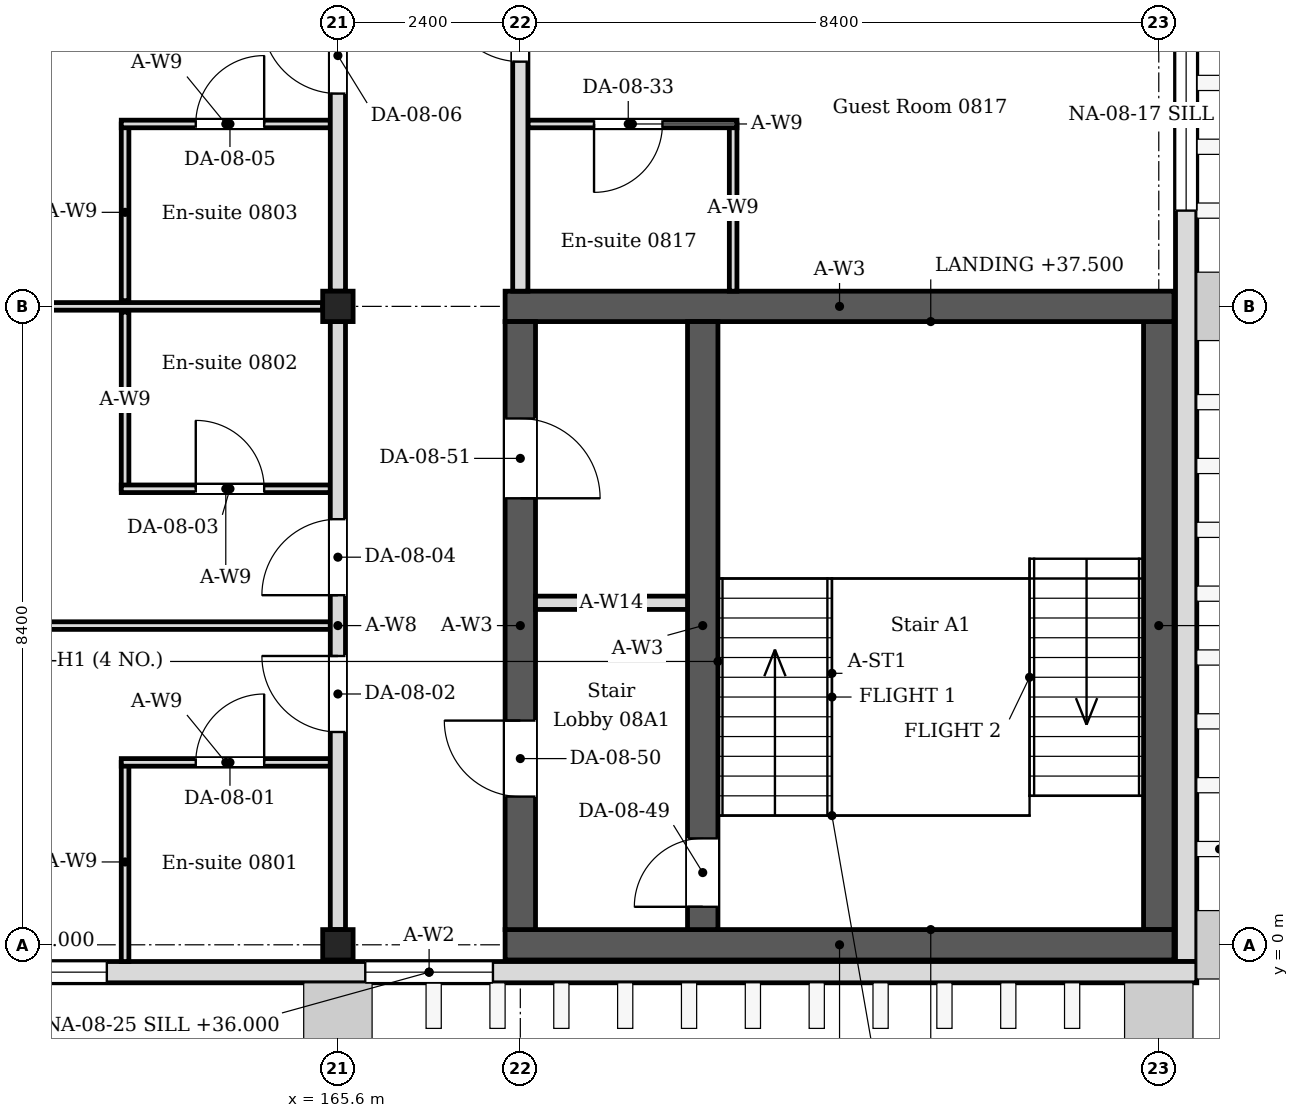
"""IFC4 building model, lengths in metres.
Left out: names, types, materials, properties, quantities, classifications, styles, units other than length and angle.
Written with IfcOpenShell. Run it as: python <this file> out.ifc"""

import sys

from ifc_helpers import new_model, si_unit, direction, frame, frame_2d, origin, origin_2d, place, context, subcontext, project, spatial, rectangle, i_section, extrude, element, fill, save


model = new_model("IFC4")
c1 = context("Model", 3, precision=1e-05, world=origin(), true_north=direction((0.0, 1.0)))
c2 = subcontext(c1, "Body", "Model", "MODEL_VIEW")
j1 = project(units=[si_unit("LENGTHUNIT", "METRE"), si_unit("PLANEANGLEUNIT", "RADIAN")], contexts=[c1])
p1 = place(None, origin())
s1 = spatial("IfcSite", under=j1, at=p1, CompositionType="ELEMENT")
p2 = place(p1, origin())
s2 = spatial("IfcBuilding", under=s1, at=p2, CompositionType="ELEMENT")
p3 = place(p2, frame((0.0, 0.0, 35.4)))
s3 = spatial("IfcBuildingStorey", under=s2, at=p3, CompositionType="ELEMENT", Elevation=35.4)
for number, where, z_axis, x_axis in (
    (1, (165.6, 0.0, 0.0), (0.0, 0.0, 1.0), (1.0, 0.0, 0.0)),
    (2, (165.6, 8.4, 0.0), (0.0, 0.0, 1.0), (1.0, 0.0, 0.0)),
):
    element("IfcColumn", number, at=place(p3, frame(where, z_axis=z_axis, x_axis=x_axis)), inside=s3, PredefinedType="COLUMN", context=c2, shape_type="SweptSolid", body=[
        extrude(i_section(OverallWidth=0.4, OverallDepth=0.4, WebThickness=0.013, FlangeThickness=0.021, FilletRadius=0.022, at=origin_2d()), origin(), (0.0, 0.0, 1.0), 4.2),
    ])
for number, where, z_axis, x_axis in (
    (3, (167.8, 0.0, 0.0), (0.0, 0.0, 1.0), (1.0, 0.0, 0.0)),
    (4, (167.8, 8.4, 0.0), (0.0, 0.0, 1.0), (1.0, 0.0, 0.0)),
):
    element("IfcWall", number, at=place(p3, frame(where, z_axis=z_axis, x_axis=x_axis)), inside=s3, PredefinedType="SOLIDWALL", context=c2, shape_type="SweptSolid", body=[
        extrude(rectangle(XDim=8.8, YDim=0.4, at=frame_2d((4.4, 0.0))), origin(), (0.0, 0.0, 1.0), 4.05),
    ])
p4 = place(p3, frame((168.0, 0.2, 0.0), z_axis=(0.0, 0.0, 1.0), x_axis=(0.0, 1.0, 0.0)))
e5 = element("IfcWall", 5, at=p4, inside=s3, PredefinedType="SOLIDWALL", context=c2, shape_type="SweptSolid", body=[
    extrude(rectangle(XDim=8.0, YDim=0.4, at=frame_2d((4.0, 0.0))), origin(), (0.0, 0.0, 1.0), 4.05),
])
p5 = place(p4, frame((1.75, 0.0, 0.0)))
e6 = element("IfcOpeningElement", 6, at=p5, cuts=e5, PredefinedType="OPENING", context=c2, shape_type="SweptSolid", body=[
    extrude(rectangle(XDim=1.0, YDim=2.1, at=frame_2d((0.5, 1.05))), frame((0.0, 0.21, 0.0), z_axis=(0.0, -1.0, 0.0), x_axis=(1.0, 0.0, 0.0)), (0.0, 0.0, 1.0), 0.42),
])
p6 = place(p4, frame((5.675, 0.0, 0.0)))
e7 = element("IfcOpeningElement", 7, at=p6, cuts=e5, PredefinedType="OPENING", context=c2, shape_type="SweptSolid", body=[
    extrude(rectangle(XDim=1.05, YDim=2.1, at=frame_2d((0.525, 1.05))), frame((0.0, 0.21, 0.0), z_axis=(0.0, -1.0, 0.0), x_axis=(1.0, 0.0, 0.0)), (0.0, 0.0, 1.0), 0.42),
])
p7 = place(p3, frame((176.4, 0.2, 0.0), z_axis=(0.0, 0.0, 1.0), x_axis=(0.0, 1.0, 0.0)))
e8 = element("IfcWall", 8, at=p7, inside=s3, PredefinedType="SOLIDWALL", context=c2, shape_type="SweptSolid", body=[
    extrude(rectangle(XDim=8.0, YDim=0.4, at=frame_2d((4.0, 0.0))), origin(), (0.0, 0.0, 1.0), 4.05),
])
p8 = place(p3, frame((176.76, -0.22, 0.0), z_axis=(0.0, 0.0, 1.0), x_axis=(0.0, 1.0, 0.0)))
e9 = element("IfcWall", 9, at=p8, inside=s3, PredefinedType="SOLIDWALL", context=c2, shape_type="SweptSolid", body=[
    extrude(rectangle(XDim=42.57, YDim=0.28, at=frame_2d((21.285, 0.0))), origin(), (0.0, 0.0, 1.0), 4.05),
])
p9 = place(p8, frame((9.88, 0.0, 0.6)))
e10 = element("IfcOpeningElement", 10, at=p9, cuts=e9, PredefinedType="OPENING", context=c2, shape_type="SweptSolid", body=[
    extrude(rectangle(XDim=2.52, YDim=2.4, at=frame_2d((1.26, 1.2))), frame((0.0, 0.15, 0.0), z_axis=(0.0, -1.0, 0.0), x_axis=(1.0, 0.0, 0.0)), (0.0, 0.0, 1.0), 0.3),
])
p10 = place(p8, frame((14.08, 0.0, 0.6)))
e11 = element("IfcOpeningElement", 11, at=p10, cuts=e9, PredefinedType="OPENING", context=c2, shape_type="SweptSolid", body=[
    extrude(rectangle(XDim=2.52, YDim=2.4, at=frame_2d((1.26, 1.2))), frame((0.0, 0.15, 0.0), z_axis=(0.0, -1.0, 0.0), x_axis=(1.0, 0.0, 0.0)), (0.0, 0.0, 1.0), 0.3),
])
p11 = place(p8, frame((17.44, 0.0, 0.6)))
e12 = element("IfcOpeningElement", 12, at=p11, cuts=e9, PredefinedType="OPENING", context=c2, shape_type="SweptSolid", body=[
    extrude(rectangle(XDim=2.52, YDim=2.4, at=frame_2d((1.26, 1.2))), frame((0.0, 0.15, 0.0), z_axis=(0.0, -1.0, 0.0), x_axis=(1.0, 0.0, 0.0)), (0.0, 0.0, 1.0), 0.3),
])
p12 = place(p8, frame((21.64, 0.0, 0.6)))
e13 = element("IfcOpeningElement", 13, at=p12, cuts=e9, PredefinedType="OPENING", context=c2, shape_type="SweptSolid", body=[
    extrude(rectangle(XDim=2.52, YDim=2.4, at=frame_2d((1.26, 1.2))), frame((0.0, 0.15, 0.0), z_axis=(0.0, -1.0, 0.0), x_axis=(1.0, 0.0, 0.0)), (0.0, 0.0, 1.0), 0.3),
])
p13 = place(p3, frame((156.7, -0.36, 0.0), z_axis=(0.0, 0.0, 1.0), x_axis=(1.0, 0.0, 0.0)))
e14 = element("IfcWall", 14, at=p13, inside=s3, PredefinedType="SOLIDWALL", context=c2, shape_type="SweptSolid", body=[
    extrude(rectangle(XDim=20.2, YDim=0.28, at=frame_2d((10.1, 0.0))), origin(), (0.0, 0.0, 1.0), 4.05),
])
p14 = place(p13, frame((9.26, 0.0, 0.6)))
e15 = element("IfcOpeningElement", 15, at=p14, cuts=e14, PredefinedType="OPENING", context=c2, shape_type="SweptSolid", body=[
    extrude(rectangle(XDim=1.68, YDim=2.4, at=frame_2d((0.84, 1.2))), frame((0.0, 0.15, 0.0), z_axis=(0.0, -1.0, 0.0), x_axis=(1.0, 0.0, 0.0)), (0.0, 0.0, 1.0), 0.3),
])
p15 = place(p13, frame((3.34, 0.0, 0.6)))
e16 = element("IfcOpeningElement", 16, at=p15, cuts=e14, PredefinedType="OPENING", context=c2, shape_type="SweptSolid", body=[
    extrude(rectangle(XDim=2.52, YDim=2.4, at=frame_2d((1.26, 1.2))), frame((0.0, 0.15, 0.0), z_axis=(0.0, -1.0, 0.0), x_axis=(1.0, 0.0, 0.0)), (0.0, 0.0, 1.0), 0.3),
])
p16 = place(p3, frame((162.8, -0.22, 0.0), z_axis=(0.0, 0.0, 1.0), x_axis=(0.0, 1.0, 0.0)))
e17 = element("IfcWall", 17, at=p16, inside=s3, PredefinedType="PARTITIONING", context=c2, shape_type="SweptSolid", body=[
    extrude(rectangle(XDim=2.62, YDim=0.1, at=frame_2d((1.31, 0.0))), origin(), (0.0, 0.0, 1.0), 4.05),
])
p17 = place(p3, frame((162.75, 2.4, 0.0), z_axis=(0.0, 0.0, 1.0), x_axis=(1.0, 0.0, 0.0)))
e18 = element("IfcWall", 18, at=p17, inside=s3, PredefinedType="PARTITIONING", context=c2, shape_type="SweptSolid", body=[
    extrude(rectangle(XDim=2.75, YDim=0.1, at=frame_2d((1.375, 0.0))), origin(), (0.0, 0.0, 1.0), 4.05),
])
p18 = place(p17, frame((0.98, 0.0, 0.0)))
e19 = element("IfcOpeningElement", 19, at=p18, cuts=e18, PredefinedType="OPENING", context=c2, shape_type="SweptSolid", body=[
    extrude(rectangle(XDim=0.9, YDim=2.1, at=frame_2d((0.45, 1.05))), frame((0.0, 0.06, 0.0), z_axis=(0.0, -1.0, 0.0), x_axis=(1.0, 0.0, 0.0)), (0.0, 0.0, 1.0), 0.12),
])
p19 = place(p3, frame((162.8, 6.0, 0.0), z_axis=(0.0, 0.0, 1.0), x_axis=(0.0, 1.0, 0.0)))
e20 = element("IfcWall", 20, at=p19, inside=s3, PredefinedType="PARTITIONING", context=c2, shape_type="SweptSolid", body=[
    extrude(rectangle(XDim=2.325, YDim=0.1, at=frame_2d((1.163, 0.0))), origin(), (0.0, 0.0, 1.0), 4.05),
])
p20 = place(p3, frame((162.75, 6.0, 0.0), z_axis=(0.0, 0.0, 1.0), x_axis=(1.0, 0.0, 0.0)))
e21 = element("IfcWall", 21, at=p20, inside=s3, PredefinedType="PARTITIONING", context=c2, shape_type="SweptSolid", body=[
    extrude(rectangle(XDim=2.75, YDim=0.1, at=frame_2d((1.375, 0.0))), origin(), (0.0, 0.0, 1.0), 4.05),
])
p21 = place(p20, frame((0.98, 0.0, 0.0)))
e22 = element("IfcOpeningElement", 22, at=p21, cuts=e21, PredefinedType="OPENING", context=c2, shape_type="SweptSolid", body=[
    extrude(rectangle(XDim=0.9, YDim=2.1, at=frame_2d((0.45, 1.05))), frame((0.0, 0.06, 0.0), z_axis=(0.0, -1.0, 0.0), x_axis=(1.0, 0.0, 0.0)), (0.0, 0.0, 1.0), 0.12),
])
p22 = place(p3, frame((162.8, 8.475, 0.0), z_axis=(0.0, 0.0, 1.0), x_axis=(0.0, 1.0, 0.0)))
e23 = element("IfcWall", 23, at=p22, inside=s3, PredefinedType="PARTITIONING", context=c2, shape_type="SweptSolid", body=[
    extrude(rectangle(XDim=2.325, YDim=0.1, at=frame_2d((1.163, 0.0))), origin(), (0.0, 0.0, 1.0), 4.05),
])
p23 = place(p3, frame((162.75, 10.8, 0.0), z_axis=(0.0, 0.0, 1.0), x_axis=(1.0, 0.0, 0.0)))
e24 = element("IfcWall", 24, at=p23, inside=s3, PredefinedType="PARTITIONING", context=c2, shape_type="SweptSolid", body=[
    extrude(rectangle(XDim=2.75, YDim=0.1, at=frame_2d((1.375, 0.0))), origin(), (0.0, 0.0, 1.0), 4.05),
])
p24 = place(p23, frame((0.98, 0.0, 0.0)))
e25 = element("IfcOpeningElement", 25, at=p24, cuts=e24, PredefinedType="OPENING", context=c2, shape_type="SweptSolid", body=[
    extrude(rectangle(XDim=0.9, YDim=2.1, at=frame_2d((0.45, 1.05))), frame((0.0, 0.06, 0.0), z_axis=(0.0, -1.0, 0.0), x_axis=(1.0, 0.0, 0.0)), (0.0, 0.0, 1.0), 0.12),
])
p25 = place(p3, frame((170.8, 8.6, 0.0), z_axis=(0.0, 0.0, 1.0), x_axis=(0.0, 1.0, 0.0)))
e26 = element("IfcWall", 26, at=p25, inside=s3, PredefinedType="PARTITIONING", context=c2, shape_type="SweptSolid", body=[
    extrude(rectangle(XDim=2.2, YDim=0.1, at=frame_2d((1.1, 0.0))), origin(), (0.0, 0.0, 1.0), 4.05),
])
p26 = place(p3, frame((170.85, 10.8, 0.0), z_axis=(0.0, 0.0, 1.0), x_axis=(-1.0, 0.0, 0.0)))
e27 = element("IfcWall", 27, at=p26, inside=s3, PredefinedType="PARTITIONING", context=c2, shape_type="SweptSolid", body=[
    extrude(rectangle(XDim=2.75, YDim=0.1, at=frame_2d((1.375, 0.0))), origin(), (0.0, 0.0, 1.0), 4.05),
])
p27 = place(p26, frame((0.98, 0.0, 0.0)))
e28 = element("IfcOpeningElement", 28, at=p27, cuts=e27, PredefinedType="OPENING", context=c2, shape_type="SweptSolid", body=[
    extrude(rectangle(XDim=0.9, YDim=2.1, at=frame_2d((0.45, 1.05))), frame((0.0, 0.06, 0.0), z_axis=(0.0, -1.0, 0.0), x_axis=(1.0, 0.0, 0.0)), (0.0, 0.0, 1.0), 0.12),
])
p28 = place(p3, frame((157.4, 8.4, 0.0), z_axis=(0.0, 0.0, 1.0), x_axis=(1.0, 0.0, 0.0)))
e29 = element("IfcWall", 29, at=p28, inside=s3, PredefinedType="PARTITIONING", context=c2, shape_type="SweptSolid", body=[
    extrude(rectangle(XDim=8.0, YDim=0.1, at=frame_2d((4.0, 0.0))), origin(), (0.0, 0.0, 1.0), 3.604),
])
p29 = place(p3, frame((156.98, 4.2, 0.0), z_axis=(0.0, 0.0, 1.0), x_axis=(1.0, 0.0, 0.0)))
e30 = element("IfcWall", 30, at=p29, inside=s3, PredefinedType="PARTITIONING", context=c2, shape_type="SweptSolid", body=[
    extrude(rectangle(XDim=8.52, YDim=0.1, at=frame_2d((4.26, 0.0))), origin(), (0.0, 0.0, 1.0), 3.604),
])
p30 = place(p3, frame((165.6, 0.2, 0.0), z_axis=(0.0, 0.0, 1.0), x_axis=(0.0, 1.0, 0.0)))
e31 = element("IfcWall", 31, at=p30, inside=s3, PredefinedType="PARTITIONING", context=c2, shape_type="SweptSolid", body=[
    extrude(rectangle(XDim=8.0, YDim=0.2, at=frame_2d((4.0, 0.0))), origin(), (0.0, 0.0, 1.0), 3.45),
])
p31 = place(p30, frame((2.6, 0.0, 0.0)))
e32 = element("IfcOpeningElement", 32, at=p31, cuts=e31, PredefinedType="OPENING", context=c2, shape_type="SweptSolid", body=[
    extrude(rectangle(XDim=1.0, YDim=2.4, at=frame_2d((0.5, 1.2))), frame((0.0, 0.11, 0.0), z_axis=(0.0, -1.0, 0.0), x_axis=(1.0, 0.0, 0.0)), (0.0, 0.0, 1.0), 0.22),
])
p32 = place(p30, frame((4.4, 0.0, 0.0)))
e33 = element("IfcOpeningElement", 33, at=p32, cuts=e31, PredefinedType="OPENING", context=c2, shape_type="SweptSolid", body=[
    extrude(rectangle(XDim=1.0, YDim=2.4, at=frame_2d((0.5, 1.2))), frame((0.0, 0.11, 0.0), z_axis=(0.0, -1.0, 0.0), x_axis=(1.0, 0.0, 0.0)), (0.0, 0.0, 1.0), 0.22),
])
p33 = place(p3, frame((165.6, 8.6, 0.0), z_axis=(0.0, 0.0, 1.0), x_axis=(0.0, 1.0, 0.0)))
e34 = element("IfcWall", 34, at=p33, inside=s3, PredefinedType="PARTITIONING", context=c2, shape_type="SweptSolid", body=[
    extrude(rectangle(XDim=8.0, YDim=0.2, at=frame_2d((4.0, 0.0))), origin(), (0.0, 0.0, 1.0), 3.45),
])
p34 = place(p33, frame((2.6, 0.0, 0.0)))
e35 = element("IfcOpeningElement", 35, at=p34, cuts=e34, PredefinedType="OPENING", context=c2, shape_type="SweptSolid", body=[
    extrude(rectangle(XDim=1.0, YDim=2.4, at=frame_2d((0.5, 1.2))), frame((0.0, 0.11, 0.0), z_axis=(0.0, -1.0, 0.0), x_axis=(1.0, 0.0, 0.0)), (0.0, 0.0, 1.0), 0.22),
])
p35 = place(p33, frame((4.4, 0.0, 0.0)))
e36 = element("IfcOpeningElement", 36, at=p35, cuts=e34, PredefinedType="OPENING", context=c2, shape_type="SweptSolid", body=[
    extrude(rectangle(XDim=1.0, YDim=2.4, at=frame_2d((0.5, 1.2))), frame((0.0, 0.11, 0.0), z_axis=(0.0, -1.0, 0.0), x_axis=(1.0, 0.0, 0.0)), (0.0, 0.0, 1.0), 0.22),
])
p36 = place(p3, frame((168.0, 8.6, 0.0), z_axis=(0.0, 0.0, 1.0), x_axis=(0.0, 1.0, 0.0)))
e37 = element("IfcWall", 37, at=p36, inside=s3, PredefinedType="PARTITIONING", context=c2, shape_type="SweptSolid", body=[
    extrude(rectangle(XDim=8.0, YDim=0.2, at=frame_2d((4.0, 0.0))), origin(), (0.0, 0.0, 1.0), 3.45),
])
p37 = place(p36, frame((3.02, 0.0, 0.0)))
e38 = element("IfcOpeningElement", 38, at=p37, cuts=e37, PredefinedType="OPENING", context=c2, shape_type="SweptSolid", body=[
    extrude(rectangle(XDim=1.0, YDim=2.4, at=frame_2d((0.5, 1.2))), frame((0.0, 0.11, 0.0), z_axis=(0.0, -1.0, 0.0), x_axis=(1.0, 0.0, 0.0)), (0.0, 0.0, 1.0), 0.22),
])
p38 = place(p36, frame((5.02, 0.0, 0.0)))
e39 = element("IfcOpeningElement", 39, at=p38, cuts=e37, PredefinedType="OPENING", context=c2, shape_type="SweptSolid", body=[
    extrude(rectangle(XDim=1.0, YDim=2.4, at=frame_2d((0.5, 1.2))), frame((0.0, 0.11, 0.0), z_axis=(0.0, -1.0, 0.0), x_axis=(1.0, 0.0, 0.0)), (0.0, 0.0, 1.0), 0.22),
])
p39 = place(p3, frame((170.4, 0.2, 0.0), z_axis=(0.0, 0.0, 1.0), x_axis=(0.0, 1.0, 0.0)))
e40 = element("IfcWall", 40, at=p39, inside=s3, PredefinedType="SOLIDWALL", context=c2, shape_type="SweptSolid", body=[
    extrude(rectangle(XDim=8.0, YDim=0.4, at=frame_2d((4.0, 0.0))), origin(), (0.0, 0.0, 1.0), 4.05),
])
p40 = place(p39, frame((0.3, 0.0, 0.0)))
e41 = element("IfcOpeningElement", 41, at=p40, cuts=e40, PredefinedType="OPENING", context=c2, shape_type="SweptSolid", body=[
    extrude(rectangle(XDim=0.9, YDim=2.1, at=frame_2d((0.45, 1.05))), frame((0.0, 0.21, 0.0), z_axis=(0.0, -1.0, 0.0), x_axis=(1.0, 0.0, 0.0)), (0.0, 0.0, 1.0), 0.42),
])
p41 = place(p3, frame((168.2, 4.5, 0.0), z_axis=(0.0, 0.0, 1.0), x_axis=(1.0, 0.0, 0.0)))
e42 = element("IfcWall", 42, at=p41, inside=s3, PredefinedType="PARTITIONING", context=c2, shape_type="SweptSolid", body=[
    extrude(rectangle(XDim=2.0, YDim=0.175, at=frame_2d((1.0, 0.0))), origin(), (0.0, 0.0, 1.0), 4.05),
])
p42 = place(p9, origin())
e43 = element("IfcWindow", 43, at=p42, inside=s3, PartitioningType="SINGLE_PANEL", PredefinedType="WINDOW", context=c2, shape_type="SweptSolid", body=[
    extrude(rectangle(XDim=2.52, YDim=2.4, at=frame_2d((1.26, 1.2))), frame((0.0, 0.03, 0.0), z_axis=(0.0, -1.0, 0.0), x_axis=(1.0, 0.0, 0.0)), (0.0, 0.0, 1.0), 0.06),
])
fill(e10, e43)
p43 = place(p14, origin())
e44 = element("IfcWindow", 44, at=p43, inside=s3, PartitioningType="SINGLE_PANEL", PredefinedType="WINDOW", context=c2, shape_type="SweptSolid", body=[
    extrude(rectangle(XDim=1.68, YDim=2.4, at=frame_2d((0.84, 1.2))), frame((0.0, 0.03, 0.0), z_axis=(0.0, -1.0, 0.0), x_axis=(1.0, 0.0, 0.0)), (0.0, 0.0, 1.0), 0.06),
])
fill(e15, e44)
p44 = place(p15, origin())
e45 = element("IfcWindow", 45, at=p44, inside=s3, PartitioningType="SINGLE_PANEL", PredefinedType="WINDOW", context=c2, shape_type="SweptSolid", body=[
    extrude(rectangle(XDim=2.52, YDim=2.4, at=frame_2d((1.26, 1.2))), frame((0.0, 0.03, 0.0), z_axis=(0.0, -1.0, 0.0), x_axis=(1.0, 0.0, 0.0)), (0.0, 0.0, 1.0), 0.06),
])
fill(e16, e45)
p45 = place(p18, origin())
e46 = element("IfcDoor", 46, at=p45, inside=s3, OperationType="SINGLE_SWING_RIGHT", PredefinedType="DOOR", context=c2, shape_type="SweptSolid", body=[
    extrude(rectangle(XDim=0.9, YDim=2.1, at=frame_2d((0.45, 1.05))), frame((0.0, 0.025, 0.0), z_axis=(0.0, -1.0, 0.0), x_axis=(1.0, 0.0, 0.0)), (0.0, 0.0, 1.0), 0.05),
])
fill(e19, e46)
p46 = place(p31, origin())
e47 = element("IfcDoor", 47, at=p46, inside=s3, OperationType="SINGLE_SWING_RIGHT", PredefinedType="DOOR", context=c2, shape_type="SweptSolid", body=[
    extrude(rectangle(XDim=1.0, YDim=2.4, at=frame_2d((0.5, 1.2))), frame((0.0, 0.025, 0.0), z_axis=(0.0, -1.0, 0.0), x_axis=(1.0, 0.0, 0.0)), (0.0, 0.0, 1.0), 0.05),
])
fill(e32, e47)
p47 = place(p21, origin())
e48 = element("IfcDoor", 48, at=p47, inside=s3, OperationType="SINGLE_SWING_LEFT", PredefinedType="DOOR", context=c2, shape_type="SweptSolid", body=[
    extrude(rectangle(XDim=0.9, YDim=2.1, at=frame_2d((0.45, 1.05))), frame((0.0, 0.025, 0.0), z_axis=(0.0, -1.0, 0.0), x_axis=(1.0, 0.0, 0.0)), (0.0, 0.0, 1.0), 0.05),
])
fill(e22, e48)
p48 = place(p32, origin())
e49 = element("IfcDoor", 49, at=p48, inside=s3, OperationType="SINGLE_SWING_LEFT", PredefinedType="DOOR", context=c2, shape_type="SweptSolid", body=[
    extrude(rectangle(XDim=1.0, YDim=2.4, at=frame_2d((0.5, 1.2))), frame((0.0, 0.025, 0.0), z_axis=(0.0, -1.0, 0.0), x_axis=(1.0, 0.0, 0.0)), (0.0, 0.0, 1.0), 0.05),
])
fill(e33, e49)
p49 = place(p24, origin())
e50 = element("IfcDoor", 50, at=p49, inside=s3, OperationType="SINGLE_SWING_RIGHT", PredefinedType="DOOR", context=c2, shape_type="SweptSolid", body=[
    extrude(rectangle(XDim=0.9, YDim=2.1, at=frame_2d((0.45, 1.05))), frame((0.0, 0.025, 0.0), z_axis=(0.0, -1.0, 0.0), x_axis=(1.0, 0.0, 0.0)), (0.0, 0.0, 1.0), 0.05),
])
fill(e25, e50)
p50 = place(p34, origin())
e51 = element("IfcDoor", 51, at=p50, inside=s3, OperationType="SINGLE_SWING_RIGHT", PredefinedType="DOOR", context=c2, shape_type="SweptSolid", body=[
    extrude(rectangle(XDim=1.0, YDim=2.4, at=frame_2d((0.5, 1.2))), frame((0.0, 0.025, 0.0), z_axis=(0.0, -1.0, 0.0), x_axis=(1.0, 0.0, 0.0)), (0.0, 0.0, 1.0), 0.05),
])
fill(e35, e51)
p51 = place(p27, origin())
e52 = element("IfcDoor", 52, at=p51, inside=s3, OperationType="SINGLE_SWING_RIGHT", PredefinedType="DOOR", context=c2, shape_type="SweptSolid", body=[
    extrude(rectangle(XDim=0.9, YDim=2.1, at=frame_2d((0.45, 1.05))), frame((0.0, 0.025, 0.0), z_axis=(0.0, -1.0, 0.0), x_axis=(1.0, 0.0, 0.0)), (0.0, 0.0, 1.0), 0.05),
])
fill(e28, e52)
p52 = place(p37, origin())
e53 = element("IfcDoor", 53, at=p52, inside=s3, OperationType="SINGLE_SWING_RIGHT", PredefinedType="DOOR", context=c2, shape_type="SweptSolid", body=[
    extrude(rectangle(XDim=1.0, YDim=2.4, at=frame_2d((0.5, 1.2))), frame((0.0, 0.025, 0.0), z_axis=(0.0, -1.0, 0.0), x_axis=(1.0, 0.0, 0.0)), (0.0, 0.0, 1.0), 0.05),
])
fill(e38, e53)
p53 = place(p40, origin())
e54 = element("IfcDoor", 54, at=p53, inside=s3, OperationType="SINGLE_SWING_LEFT", PredefinedType="DOOR", context=c2, shape_type="SweptSolid", body=[
    extrude(rectangle(XDim=0.9, YDim=2.1, at=frame_2d((0.45, 1.05))), frame((0.0, 0.025, 0.0), z_axis=(0.0, -1.0, 0.0), x_axis=(1.0, 0.0, 0.0)), (0.0, 0.0, 1.0), 0.05),
])
fill(e41, e54)
p54 = place(p5, origin())
e55 = element("IfcDoor", 55, at=p54, inside=s3, OperationType="SINGLE_SWING_RIGHT", PredefinedType="DOOR", context=c2, shape_type="SweptSolid", body=[
    extrude(rectangle(XDim=1.0, YDim=2.1, at=frame_2d((0.5, 1.05))), frame((0.0, 0.025, 0.0), z_axis=(0.0, -1.0, 0.0), x_axis=(1.0, 0.0, 0.0)), (0.0, 0.0, 1.0), 0.05),
])
fill(e6, e55)
p55 = place(p6, origin())
e56 = element("IfcDoor", 56, at=p55, inside=s3, OperationType="SINGLE_SWING_LEFT", PredefinedType="DOOR", context=c2, shape_type="SweptSolid", body=[
    extrude(rectangle(XDim=1.05, YDim=2.1, at=frame_2d((0.525, 1.05))), frame((0.0, 0.025, 0.0), z_axis=(0.0, -1.0, 0.0), x_axis=(1.0, 0.0, 0.0)), (0.0, 0.0, 1.0), 0.05),
])
fill(e7, e56)
save(model, sys.argv[1])
